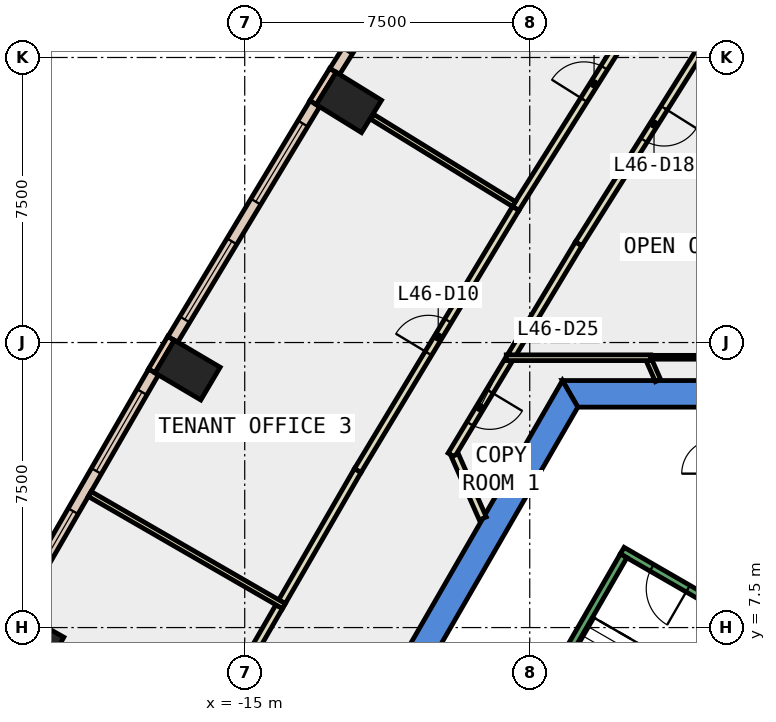
"""IFC4 building model, lengths in metres.
Left out: names, types, materials, properties, quantities, classifications, styles, units other than length and angle.
Written with IfcOpenShell. Run it as: python <this file> out.ifc"""

import sys

from ifc_helpers import new_model, si_unit, direction, frame, frame_2d, origin, origin_2d, place, context, subcontext, project, spatial, polyline, rectangle, outline, extrude, element, fill, save


model = new_model("IFC4")
c1 = context("Model", 3, precision=1e-05, world=origin(), true_north=direction((0.0, 1.0)))
c2 = subcontext(c1, "Body", "Model", "MODEL_VIEW")
j1 = project(units=[si_unit("LENGTHUNIT", "METRE"), si_unit("PLANEANGLEUNIT", "RADIAN")], contexts=[c1])
p1 = place(None, origin())
s1 = spatial("IfcSite", under=j1, at=p1, CompositionType="ELEMENT")
p2 = place(p1, origin())
s2 = spatial("IfcBuilding", under=s1, at=p2, CompositionType="ELEMENT")
p3 = place(p2, frame((0.0, 0.0, 206.6)))
s3 = spatial("IfcBuildingStorey", under=s2, at=p3, CompositionType="ELEMENT", Elevation=206.6)
for number, where, z_axis, x_axis in (
    (1, (-12.259, 21.317, -0.4), (0.0, 0.0, 1.0), (0.525, 0.851, 0.0)),
    (2, (-16.504, 14.275, -0.4), (0.0, 0.0, 1.0), (0.509, 0.861, 0.0)),
    (3, (-20.615, 7.155, -0.4), (0.0, 0.0, 1.0), (0.491, 0.871, 0.0)),
):
    element("IfcColumn", number, at=place(p3, frame(where, z_axis=z_axis, x_axis=x_axis)), inside=s3, PredefinedType="COLUMN", context=c2, shape_type="SweptSolid", body=[
        extrude(rectangle(XDim=1.0, YDim=1.4, at=origin_2d()), origin(), (0.0, 0.0, 1.0), 4.2),
    ])
p4 = place(p3, frame((0.0, 0.0, -0.4)))
e4 = element("IfcWall", 4, at=p4, inside=s3, PredefinedType="SHEAR", context=c2, shape_type="SweptSolid", body=[
    extrude(outline(polyline([(6.64, 14.0), (-6.64, 14.0), (-6.235, 13.3), (6.235, 13.3), (6.64, 14.0)])), origin(), (0.0, 0.0, 1.0), 4.2),
])
p5 = place(p3, frame((0.0, 0.0, -0.4)))
e5 = element("IfcWall", 5, at=p5, inside=s3, PredefinedType="SHEAR", context=c2, shape_type="SweptSolid", body=[
    extrude(outline(polyline([(-11.834, 5.002), (-11.228, 4.652), (-6.235, 13.3), (-6.64, 14.0), (-11.834, 5.002)])), origin(), (0.0, 0.0, 1.0), 4.2),
])
p6 = place(p3, frame((-12.677, 22.163, 0.0), z_axis=(0.0, 0.0, 1.0), x_axis=(-0.525648735675, -0.850701714282, 0.0)))
e6 = element("IfcWall", 6, at=p6, inside=s3, PredefinedType="STANDARD", context=c2, shape_type="SweptSolid", body=[
    extrude(rectangle(XDim=1.0, YDim=0.2, at=frame_2d((0.5, 0.0))), origin(), (0.0, 0.0, 1.0), 3.8),
])
p7 = place(p3, frame((-16.939, 15.113, 0.0), z_axis=(0.0, 0.0, 1.0), x_axis=(-0.508161541526, -0.861261776531, 0.0)))
e7 = element("IfcWall", 7, at=p7, inside=s3, PredefinedType="STANDARD", context=c2, shape_type="SweptSolid", body=[
    extrude(rectangle(XDim=1.0, YDim=0.2, at=frame_2d((0.5, 0.0))), origin(), (0.0, 0.0, 1.0), 3.8),
])
p8 = place(p3, frame((-8.759, 28.29, 0.0), z_axis=(0.0, 0.0, 1.0), x_axis=(-0.532522107002, -0.84641609481, 0.0)))
e8 = element("IfcWall", 8, at=p8, inside=s3, PredefinedType="STANDARD", context=c2, shape_type="SweptSolid", body=[
    extrude(rectangle(XDim=7.273, YDim=0.3, at=frame_2d((3.636, 0.0))), origin(), (0.0, 0.0, 1.0), 3.8),
])
p9 = place(p8, frame((0.618, 0.0, 0.9)))
e9 = element("IfcOpeningElement", 9, at=p9, cuts=e8, PredefinedType="OPENING", context=c2, shape_type="SweptSolid", body=[
    extrude(rectangle(XDim=2.4, YDim=2.6, at=frame_2d((1.2, 1.3))), frame((0.0, 0.16, 0.0), z_axis=(0.0, -1.0, 0.0), x_axis=(1.0, 0.0, 0.0)), (0.0, 0.0, 1.0), 0.32),
])
p10 = place(p8, frame((4.255, 0.0, 0.9)))
e10 = element("IfcOpeningElement", 10, at=p10, cuts=e8, PredefinedType="OPENING", context=c2, shape_type="SweptSolid", body=[
    extrude(rectangle(XDim=2.4, YDim=2.6, at=frame_2d((1.2, 1.3))), frame((0.0, 0.16, 0.0), z_axis=(0.0, -1.0, 0.0), x_axis=(1.0, 0.0, 0.0)), (0.0, 0.0, 1.0), 0.32),
])
p11 = place(p3, frame((-13.155, 21.284, 0.0), z_axis=(0.0, 0.0, 1.0), x_axis=(-0.516230553484, -0.856449657394, 0.0)))
e11 = element("IfcWall", 11, at=p11, inside=s3, PredefinedType="STANDARD", context=c2, shape_type="SweptSolid", body=[
    extrude(rectangle(XDim=7.239, YDim=0.3, at=frame_2d((3.62, 0.0))), origin(), (0.0, 0.0, 1.0), 3.8),
])
p12 = place(p11, frame((0.61, 0.0, 0.9)))
e12 = element("IfcOpeningElement", 12, at=p12, cuts=e11, PredefinedType="OPENING", context=c2, shape_type="SweptSolid", body=[
    extrude(rectangle(XDim=2.4, YDim=2.6, at=frame_2d((1.2, 1.3))), frame((0.0, 0.16, 0.0), z_axis=(0.0, -1.0, 0.0), x_axis=(1.0, 0.0, 0.0)), (0.0, 0.0, 1.0), 0.32),
])
p13 = place(p11, frame((4.229, 0.0, 0.9)))
e13 = element("IfcOpeningElement", 13, at=p13, cuts=e11, PredefinedType="OPENING", context=c2, shape_type="SweptSolid", body=[
    extrude(rectangle(XDim=2.4, YDim=2.6, at=frame_2d((1.2, 1.3))), frame((0.0, 0.16, 0.0), z_axis=(0.0, -1.0, 0.0), x_axis=(1.0, 0.0, 0.0)), (0.0, 0.0, 1.0), 0.32),
])
p14 = place(p3, frame((-17.399, 14.225, 0.0), z_axis=(0.0, 0.0, 1.0), x_axis=(-0.500012402131, -0.866018243292, 0.0)))
e14 = element("IfcWall", 14, at=p14, inside=s3, PredefinedType="STANDARD", context=c2, shape_type="SweptSolid", body=[
    extrude(rectangle(XDim=7.24, YDim=0.3, at=frame_2d((3.62, 0.0))), origin(), (0.0, 0.0, 1.0), 3.8),
])
p15 = place(p14, frame((0.61, 0.0, 0.9)))
e15 = element("IfcOpeningElement", 15, at=p15, cuts=e14, PredefinedType="OPENING", context=c2, shape_type="SweptSolid", body=[
    extrude(rectangle(XDim=2.4, YDim=2.6, at=frame_2d((1.2, 1.3))), frame((0.0, 0.16, 0.0), z_axis=(0.0, -1.0, 0.0), x_axis=(1.0, 0.0, 0.0)), (0.0, 0.0, 1.0), 0.32),
])
p16 = place(p14, frame((4.23, 0.0, 0.9)))
e16 = element("IfcOpeningElement", 16, at=p16, cuts=e14, PredefinedType="OPENING", context=c2, shape_type="SweptSolid", body=[
    extrude(rectangle(XDim=2.4, YDim=2.6, at=frame_2d((1.2, 1.3))), frame((0.0, 0.16, 0.0), z_axis=(0.0, -1.0, 0.0), x_axis=(1.0, 0.0, 0.0)), (0.0, 0.0, 1.0), 0.32),
])
p17 = place(p3, frame((-8.057, 14.536, 0.0), z_axis=(0.0, 0.0, 1.0), x_axis=(-0.516268010323, -0.856427078926, 0.0)))
e17 = element("IfcWall", 17, at=p17, inside=s3, PredefinedType="PARTITIONING", context=c2, shape_type="SweptSolid", body=[
    extrude(rectangle(XDim=2.915, YDim=0.2, at=frame_2d((1.458, 0.0))), origin(), (0.0, 0.0, 1.0), 3.8),
])
p18 = place(p17, frame((0.958, 0.0, 0.0)))
e18 = element("IfcOpeningElement", 18, at=p18, cuts=e17, PredefinedType="OPENING", context=c2, shape_type="SweptSolid", body=[
    extrude(rectangle(XDim=1.0, YDim=2.1, at=frame_2d((0.5, 1.05))), frame((0.0, 0.11, 0.0), z_axis=(0.0, -1.0, 0.0), x_axis=(1.0, 0.0, 0.0)), (0.0, 0.0, 1.0), 0.22),
])
p19 = place(p3, frame((-9.47, 12.033, 0.0), z_axis=(0.0, 0.0, 1.0), x_axis=(0.40441741061, -0.914574522931, 0.0)))
e19 = element("IfcWall", 19, at=p19, inside=s3, PredefinedType="PARTITIONING", context=c2, shape_type="SweptSolid", body=[
    extrude(rectangle(XDim=1.817, YDim=0.2, at=frame_2d((0.909, 0.0))), origin(), (0.0, 0.0, 1.0), 3.8),
])
p20 = place(p3, frame((-2.246, 23.9, 0.0), z_axis=(0.0, 0.0, 1.0), x_axis=(-0.532527247309, -0.846412860768, 0.0)))
e20 = element("IfcWall", 20, at=p20, inside=s3, PredefinedType="PARTITIONING", context=c2, shape_type="SweptSolid", body=[
    extrude(rectangle(XDim=7.449, YDim=0.2, at=frame_2d((3.725, 0.0))), origin(), (0.0, 0.0, 1.0), 3.8),
])
p21 = place(p20, frame((3.225, 0.0, 0.0)))
e21 = element("IfcOpeningElement", 21, at=p21, cuts=e20, PredefinedType="OPENING", context=c2, shape_type="SweptSolid", body=[
    extrude(rectangle(XDim=1.0, YDim=2.1, at=frame_2d((0.5, 1.05))), frame((0.0, 0.11, 0.0), z_axis=(0.0, -1.0, 0.0), x_axis=(1.0, 0.0, 0.0)), (0.0, 0.0, 1.0), 0.22),
])
p22 = place(p3, frame((-6.213, 17.595, 0.0), z_axis=(0.0, 0.0, 1.0), x_axis=(-0.516121112316, -0.856515614231, 0.0)))
e22 = element("IfcWall", 22, at=p22, inside=s3, PredefinedType="PARTITIONING", context=c2, shape_type="SweptSolid", body=[
    extrude(rectangle(XDim=3.422, YDim=0.2, at=frame_2d((1.711, 0.0))), origin(), (0.0, 0.0, 1.0), 3.8),
])
p23 = place(p3, frame((-7.871, 18.528, 0.0), z_axis=(0.0, 0.0, 1.0), x_axis=(0.532587642146, 0.846374859878, 0.0)))
e23 = element("IfcWall", 23, at=p23, inside=s3, PredefinedType="PARTITIONING", context=c2, shape_type="SweptSolid", body=[
    extrude(rectangle(XDim=7.749, YDim=0.2, at=frame_2d((3.875, 0.0))), origin(), (0.0, 0.0, 1.0), 3.8),
])
p24 = place(p23, frame((3.375, 0.0, 0.0)))
e24 = element("IfcOpeningElement", 24, at=p24, cuts=e23, PredefinedType="OPENING", context=c2, shape_type="SweptSolid", body=[
    extrude(rectangle(XDim=1.0, YDim=2.1, at=frame_2d((0.5, 1.05))), frame((0.0, 0.11, 0.0), z_axis=(0.0, -1.0, 0.0), x_axis=(1.0, 0.0, 0.0)), (0.0, 0.0, 1.0), 0.22),
])
p25 = place(p3, frame((-14.019, 8.18, 0.0), z_axis=(0.0, 0.0, 1.0), x_axis=(0.500089897431, 0.865973495257, 0.0)))
e25 = element("IfcWall", 25, at=p25, inside=s3, PredefinedType="PARTITIONING", context=c2, shape_type="SweptSolid", body=[
    extrude(rectangle(XDim=3.988, YDim=0.2, at=frame_2d((1.994, 0.0))), origin(), (0.0, 0.0, 1.0), 3.8),
])
p26 = place(p3, frame((-12.025, 11.633, 0.0), z_axis=(0.0, 0.0, 1.0), x_axis=(0.516283129542, 0.856417964636, 0.0)))
e26 = element("IfcWall", 26, at=p26, inside=s3, PredefinedType="PARTITIONING", context=c2, shape_type="SweptSolid", body=[
    extrude(rectangle(XDim=8.05, YDim=0.2, at=frame_2d((4.025, 0.0))), origin(), (0.0, 0.0, 1.0), 3.8),
])
p27 = place(p26, frame((3.6, 0.0, 0.0)))
e27 = element("IfcOpeningElement", 27, at=p27, cuts=e26, PredefinedType="OPENING", context=c2, shape_type="SweptSolid", body=[
    extrude(rectangle(XDim=1.0, YDim=2.1, at=frame_2d((0.5, 1.05))), frame((0.0, 0.11, 0.0), z_axis=(0.0, -1.0, 0.0), x_axis=(1.0, 0.0, 0.0)), (0.0, 0.0, 1.0), 0.22),
])
p28 = place(p3, frame((-16.087, 4.597, 0.0), z_axis=(0.0, 0.0, 1.0), x_axis=(0.499860276602, 0.866106058099, 0.0)))
e28 = element("IfcWall", 28, at=p28, inside=s3, PredefinedType="PARTITIONING", context=c2, shape_type="SweptSolid", body=[
    extrude(rectangle(XDim=3.987, YDim=0.2, at=frame_2d((1.994, 0.0))), origin(), (0.0, 0.0, 1.0), 3.8),
])
p29 = place(p28, frame((1.494, 0.0, 0.0)))
e29 = element("IfcOpeningElement", 29, at=p29, cuts=e28, PredefinedType="OPENING", context=c2, shape_type="SweptSolid", body=[
    extrude(rectangle(XDim=1.0, YDim=2.1, at=frame_2d((0.5, 1.05))), frame((0.0, 0.11, 0.0), z_axis=(0.0, -1.0, 0.0), x_axis=(1.0, 0.0, 0.0)), (0.0, 0.0, 1.0), 0.22),
])
p30 = place(p3, frame((-4.125, 14.0, 0.0), z_axis=(0.0, 0.0, 1.0), x_axis=(-0.404850841056, 0.914382740703, 0.0)))
e30 = element("IfcWall", 30, at=p30, inside=s3, PredefinedType="PARTITIONING", context=c2, shape_type="SweptSolid", body=[
    extrude(rectangle(XDim=0.581, YDim=0.15, at=frame_2d((0.291, 0.0))), origin(), (0.0, 0.0, 1.0), 3.8),
])
p31 = place(p3, frame((-4.316, 14.6, 0.0), z_axis=(0.0, 0.0, 1.0), x_axis=(-1.0, 0.0, 0.0)))
e31 = element("IfcWall", 31, at=p31, inside=s3, PredefinedType="PARTITIONING", context=c2, shape_type="SweptSolid", body=[
    extrude(rectangle(XDim=3.802, YDim=0.15, at=frame_2d((1.901, 0.0))), origin(), (0.0, 0.0, 1.0), 3.8),
])
p32 = place(p3, frame((-4.316, 14.612, 0.0), z_axis=(0.0, 0.0, 1.0), x_axis=(1.0, 0.0, 0.0)))
e32 = element("IfcWall", 32, at=p32, inside=s3, PredefinedType="PARTITIONING", context=c2, shape_type="SweptSolid", body=[
    extrude(rectangle(XDim=4.266, YDim=0.1, at=frame_2d((2.133, 0.0))), origin(), (0.0, 0.0, 1.0), 3.8),
])
p33 = place(p3, frame((-7.916, 18.644, 0.0), z_axis=(0.0, 0.0, 1.0), x_axis=(-0.851543444049, 0.524284047914, 0.0)))
e33 = element("IfcWall", 33, at=p33, inside=s3, PredefinedType="PARTITIONING", context=c2, shape_type="SweptSolid", body=[
    extrude(rectangle(XDim=4.379, YDim=0.15, at=frame_2d((2.189, 0.0))), origin(), (0.0, 0.0, 1.0), 3.8),
])
p34 = place(p3, frame((-13.97, 8.065, 0.0), z_axis=(0.0, 0.0, 1.0), x_axis=(-0.866011230889, 0.500024547371, 0.0)))
e34 = element("IfcWall", 34, at=p34, inside=s3, PredefinedType="PARTITIONING", context=c2, shape_type="SweptSolid", body=[
    extrude(rectangle(XDim=5.9, YDim=0.15, at=frame_2d((2.95, 0.0))), origin(), (0.0, 0.0, 1.0), 3.8),
])
p35 = place(p3, frame((-1.256, 7.324, 0.0), z_axis=(0.0, 0.0, 1.0), x_axis=(-0.866046073146, 0.499964197906, 0.0)))
e35 = element("IfcWall", 35, at=p35, inside=s3, PredefinedType="STANDARD", context=c2, shape_type="SweptSolid", body=[
    extrude(rectangle(XDim=4.4, YDim=0.2, at=frame_2d((2.2, 0.0))), origin(), (0.0, 0.0, 1.0), 3.8),
])
p36 = place(p35, frame((2.4, 0.0, 0.0)))
e36 = element("IfcOpeningElement", 36, at=p36, cuts=e35, PredefinedType="OPENING", context=c2, shape_type="SweptSolid", body=[
    extrude(rectangle(XDim=1.1, YDim=2.2, at=frame_2d((0.55, 1.1))), frame((0.0, 0.11, 0.0), z_axis=(0.0, -1.0, 0.0), x_axis=(1.0, 0.0, 0.0)), (0.0, 0.0, 1.0), 0.22),
])
p37 = place(p3, frame((-1.393, 7.288, 0.0), z_axis=(0.0, 0.0, 1.0), x_axis=(-0.499963383562, -0.866046543262, 0.0)))
e37 = element("IfcWall", 37, at=p37, inside=s3, PredefinedType="STANDARD", context=c2, shape_type="SweptSolid", body=[
    extrude(rectangle(XDim=6.9, YDim=0.2, at=frame_2d((3.45, 0.0))), origin(), (0.0, 0.0, 1.0), 3.8),
])
p38 = place(p37, frame((0.45, 0.0, 0.0)))
e38 = element("IfcOpeningElement", 38, at=p38, cuts=e37, PredefinedType="OPENING", context=c2, shape_type="SweptSolid", body=[
    extrude(rectangle(XDim=1.1, YDim=2.2, at=frame_2d((0.55, 1.1))), frame((0.0, 0.11, 0.0), z_axis=(0.0, -1.0, 0.0), x_axis=(1.0, 0.0, 0.0)), (0.0, 0.0, 1.0), 0.22),
])
p39 = place(p3, frame((-5.03, 9.388, 0.0), z_axis=(0.0, 0.0, 1.0), x_axis=(-0.499978703459, -0.866037698999, 0.0)))
e39 = element("IfcWall", 39, at=p39, inside=s3, PredefinedType="STANDARD", context=c2, shape_type="SweptSolid", body=[
    extrude(rectangle(XDim=6.9, YDim=0.2, at=frame_2d((3.45, 0.0))), origin(), (0.0, 0.0, 1.0), 3.8),
])
p40 = place(p12, origin())
e40 = element("IfcWindow", 40, at=p40, inside=s3, PartitioningType="SINGLE_PANEL", PredefinedType="WINDOW", context=c2, shape_type="SweptSolid", body=[
    extrude(rectangle(XDim=2.4, YDim=2.6, at=frame_2d((1.2, 1.3))), frame((0.0, 0.03, 0.0), z_axis=(0.0, -1.0, 0.0), x_axis=(1.0, 0.0, 0.0)), (0.0, 0.0, 1.0), 0.06),
])
fill(e12, e40)
p41 = place(p13, origin())
e41 = element("IfcWindow", 41, at=p41, inside=s3, PartitioningType="SINGLE_PANEL", PredefinedType="WINDOW", context=c2, shape_type="SweptSolid", body=[
    extrude(rectangle(XDim=2.4, YDim=2.6, at=frame_2d((1.2, 1.3))), frame((0.0, 0.03, 0.0), z_axis=(0.0, -1.0, 0.0), x_axis=(1.0, 0.0, 0.0)), (0.0, 0.0, 1.0), 0.06),
])
fill(e13, e41)
p42 = place(p15, origin())
e42 = element("IfcWindow", 42, at=p42, inside=s3, PartitioningType="SINGLE_PANEL", PredefinedType="WINDOW", context=c2, shape_type="SweptSolid", body=[
    extrude(rectangle(XDim=2.4, YDim=2.6, at=frame_2d((1.2, 1.3))), frame((0.0, 0.03, 0.0), z_axis=(0.0, -1.0, 0.0), x_axis=(1.0, 0.0, 0.0)), (0.0, 0.0, 1.0), 0.06),
])
fill(e15, e42)
p43 = place(p16, origin())
e43 = element("IfcWindow", 43, at=p43, inside=s3, PartitioningType="SINGLE_PANEL", PredefinedType="WINDOW", context=c2, shape_type="SweptSolid", body=[
    extrude(rectangle(XDim=2.4, YDim=2.6, at=frame_2d((1.2, 1.3))), frame((0.0, 0.03, 0.0), z_axis=(0.0, -1.0, 0.0), x_axis=(1.0, 0.0, 0.0)), (0.0, 0.0, 1.0), 0.06),
])
fill(e16, e43)
p44 = place(p24, origin())
e44 = element("IfcDoor", 44, at=p44, inside=s3, OperationType="SINGLE_SWING_LEFT", PredefinedType="DOOR", context=c2, shape_type="SweptSolid", body=[
    extrude(rectangle(XDim=1.0, YDim=2.1, at=frame_2d((0.5, 1.05))), frame((0.0, 0.025, 0.0), z_axis=(0.0, -1.0, 0.0), x_axis=(1.0, 0.0, 0.0)), (0.0, 0.0, 1.0), 0.05),
])
fill(e24, e44)
p45 = place(p27, origin())
e45 = element("IfcDoor", 45, at=p45, inside=s3, OperationType="SINGLE_SWING_LEFT", PredefinedType="DOOR", context=c2, shape_type="SweptSolid", body=[
    extrude(rectangle(XDim=1.0, YDim=2.1, at=frame_2d((0.5, 1.05))), frame((0.0, 0.025, 0.0), z_axis=(0.0, -1.0, 0.0), x_axis=(1.0, 0.0, 0.0)), (0.0, 0.0, 1.0), 0.05),
])
fill(e27, e45)
p46 = place(p21, origin())
e46 = element("IfcDoor", 46, at=p46, inside=s3, OperationType="SINGLE_SWING_LEFT", PredefinedType="DOOR", context=c2, shape_type="SweptSolid", body=[
    extrude(rectangle(XDim=1.0, YDim=2.1, at=frame_2d((0.5, 1.05))), frame((0.0, 0.025, 0.0), z_axis=(0.0, -1.0, 0.0), x_axis=(1.0, 0.0, 0.0)), (0.0, 0.0, 1.0), 0.05),
])
fill(e21, e46)
p47 = place(p18, origin())
e47 = element("IfcDoor", 47, at=p47, inside=s3, OperationType="SINGLE_SWING_LEFT", PredefinedType="DOOR", context=c2, shape_type="SweptSolid", body=[
    extrude(rectangle(XDim=1.0, YDim=2.1, at=frame_2d((0.5, 1.05))), frame((0.0, 0.025, 0.0), z_axis=(0.0, -1.0, 0.0), x_axis=(1.0, 0.0, 0.0)), (0.0, 0.0, 1.0), 0.05),
])
fill(e18, e47)
p48 = place(p36, origin())
e48 = element("IfcDoor", 48, at=p48, inside=s3, OperationType="SINGLE_SWING_LEFT", PredefinedType="DOOR", context=c2, shape_type="SweptSolid", body=[
    extrude(rectangle(XDim=1.1, YDim=2.2, at=frame_2d((0.55, 1.1))), frame((0.0, 0.025, 0.0), z_axis=(0.0, -1.0, 0.0), x_axis=(1.0, 0.0, 0.0)), (0.0, 0.0, 1.0), 0.05),
])
fill(e36, e48)
save(model, sys.argv[1])
